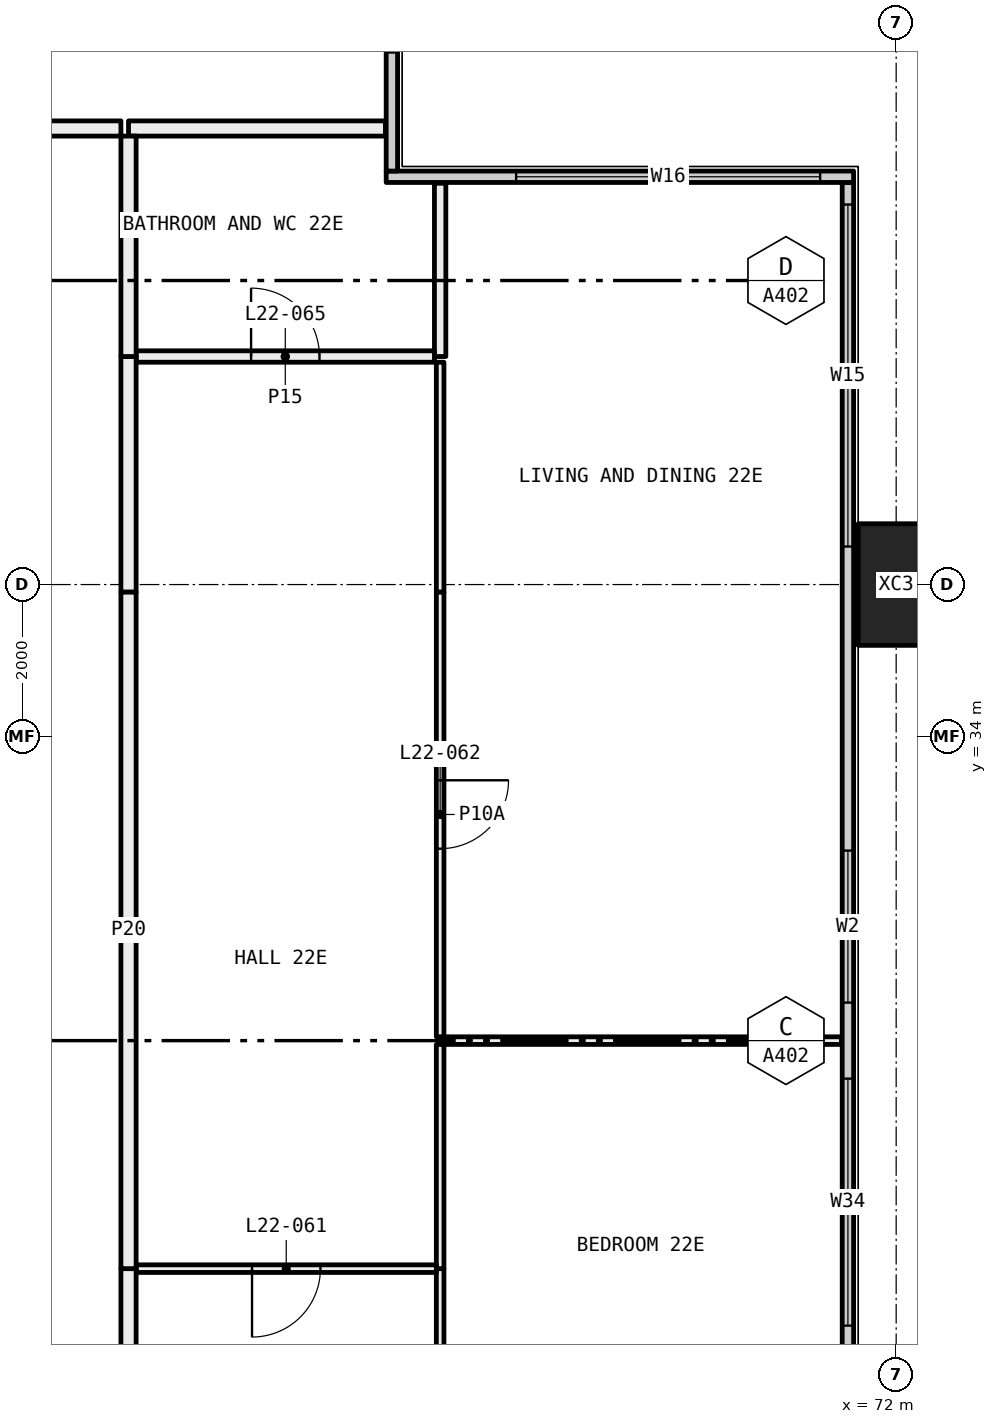
"""IFC4 building model, lengths in metres.
Left out: names, types, materials, properties, quantities, classifications, styles, units other than length and angle.
Written with IfcOpenShell. Run it as: python <this file> out.ifc"""

import sys

from ifc_helpers import new_model, si_unit, direction, frame, frame_2d, origin, origin_2d, place, context, subcontext, project, spatial, rectangle, hollow_rectangle, extrude, element, fill, save


model = new_model("IFC4")
c1 = context("Model", 3, precision=1e-05, world=origin(), true_north=direction((0.0, 1.0)))
c2 = subcontext(c1, "Body", "Model", "MODEL_VIEW")
j1 = project(units=[si_unit("LENGTHUNIT", "METRE"), si_unit("PLANEANGLEUNIT", "RADIAN")], contexts=[c1])
p1 = place(None, origin())
s1 = spatial("IfcSite", under=j1, at=p1, CompositionType="ELEMENT")
p2 = place(p1, origin())
s2 = spatial("IfcBuilding", under=s1, at=p2, CompositionType="ELEMENT")
p3 = place(p2, frame((0.0, 0.0, 88.65)))
s3 = spatial("IfcBuildingStorey", under=s2, at=p3, CompositionType="ELEMENT", Elevation=88.65)
p4 = place(p3, frame((72.0, 36.0, -0.4), z_axis=(0.0, 0.0, 1.0), x_axis=(0.0, 1.0, 0.0)))
e1 = element("IfcColumn", 1, at=p4, inside=s3, PredefinedType="COLUMN", context=c2, shape_type="SweptSolid", body=[
    extrude(hollow_rectangle(XDim=1.6, YDim=1.0, WallThickness=0.065, at=origin_2d()), origin(), (0.0, 0.0, 1.0), 3.45),
])
p5 = place(p3, frame((71.365, 6.71, 0.0), z_axis=(0.0, 0.0, 1.0), x_axis=(0.0, 1.0, 0.0)))
e2 = element("IfcWall", 2, at=p5, inside=s3, PredefinedType="ELEMENTEDWALL", context=c2, shape_type="SweptSolid", body=[
    extrude(rectangle(XDim=34.58, YDim=0.15, at=frame_2d((17.29, 0.0))), origin(), (0.0, 0.0, 1.0), 3.05),
])
p6 = place(p5, frame((0.29, 0.0, 0.45)))
e3 = element("IfcOpeningElement", 3, at=p6, cuts=e2, PredefinedType="OPENING", context=c2, shape_type="SweptSolid", body=[
    extrude(rectangle(XDim=4.5, YDim=2.55, at=frame_2d((2.25, 1.275))), frame((0.0, 0.085, 0.0), z_axis=(0.0, -1.0, 0.0), x_axis=(1.0, 0.0, 0.0)), (0.0, 0.0, 1.0), 0.17),
])
p7 = place(p5, frame((7.54, 0.0, 0.45)))
e4 = element("IfcOpeningElement", 4, at=p7, cuts=e2, PredefinedType="OPENING", context=c2, shape_type="SweptSolid", body=[
    extrude(rectangle(XDim=3.25, YDim=2.55, at=frame_2d((1.625, 1.275))), frame((0.0, 0.085, 0.0), z_axis=(0.0, -1.0, 0.0), x_axis=(1.0, 0.0, 0.0)), (0.0, 0.0, 1.0), 0.17),
])
p8 = place(p5, frame((11.79, 0.0, 0.45)))
e5 = element("IfcOpeningElement", 5, at=p8, cuts=e2, PredefinedType="OPENING", context=c2, shape_type="SweptSolid", body=[
    extrude(rectangle(XDim=3.25, YDim=2.55, at=frame_2d((1.625, 1.275))), frame((0.0, 0.085, 0.0), z_axis=(0.0, -1.0, 0.0), x_axis=(1.0, 0.0, 0.0)), (0.0, 0.0, 1.0), 0.17),
])
p9 = place(p5, frame((19.54, 0.0, 0.45)))
e6 = element("IfcOpeningElement", 6, at=p9, cuts=e2, PredefinedType="OPENING", context=c2, shape_type="SweptSolid", body=[
    extrude(rectangle(XDim=3.25, YDim=2.55, at=frame_2d((1.625, 1.275))), frame((0.0, 0.085, 0.0), z_axis=(0.0, -1.0, 0.0), x_axis=(1.0, 0.0, 0.0)), (0.0, 0.0, 1.0), 0.17),
])
p10 = place(p5, frame((23.79, 0.0, 0.45)))
e7 = element("IfcOpeningElement", 7, at=p10, cuts=e2, PredefinedType="OPENING", context=c2, shape_type="SweptSolid", body=[
    extrude(rectangle(XDim=2.0, YDim=2.55, at=frame_2d((1.0, 1.275))), frame((0.0, 0.085, 0.0), z_axis=(0.0, -1.0, 0.0), x_axis=(1.0, 0.0, 0.0)), (0.0, 0.0, 1.0), 0.17),
])
p11 = place(p5, frame((29.79, 0.0, 0.45)))
e8 = element("IfcOpeningElement", 8, at=p11, cuts=e2, PredefinedType="OPENING", context=c2, shape_type="SweptSolid", body=[
    extrude(rectangle(XDim=4.5, YDim=2.55, at=frame_2d((2.25, 1.275))), frame((0.0, 0.085, 0.0), z_axis=(0.0, -1.0, 0.0), x_axis=(1.0, 0.0, 0.0)), (0.0, 0.0, 1.0), 0.17),
])
p12 = place(p3, frame((65.29, 41.365, 0.0), z_axis=(0.0, 0.0, 1.0), x_axis=(1.0, 0.0, 0.0)))
e9 = element("IfcWall", 9, at=p12, inside=s3, PredefinedType="ELEMENTEDWALL", context=c2, shape_type="SweptSolid", body=[
    extrude(rectangle(XDim=6.15, YDim=0.15, at=frame_2d((3.075, 0.0))), origin(), (0.0, 0.0, 1.0), 3.05),
])
p13 = place(p12, frame((1.71, 0.0, 0.45)))
e10 = element("IfcOpeningElement", 10, at=p13, cuts=e9, PredefinedType="OPENING", context=c2, shape_type="SweptSolid", body=[
    extrude(rectangle(XDim=4.0, YDim=2.55, at=frame_2d((2.0, 1.275))), frame((0.0, 0.085, 0.0), z_axis=(0.0, -1.0, 0.0), x_axis=(1.0, 0.0, 0.0)), (0.0, 0.0, 1.0), 0.17),
])
p14 = place(p3, frame((65.365, 41.44, 0.0), z_axis=(0.0, 0.0, 1.0), x_axis=(0.0, 1.0, 0.0)))
e11 = element("IfcWall", 11, at=p14, inside=s3, PredefinedType="ELEMENTEDWALL", context=c2, shape_type="SweptSolid", body=[
    extrude(rectangle(XDim=5.85, YDim=0.15, at=frame_2d((2.925, 0.0))), origin(), (0.0, 0.0, 1.0), 3.05),
])
p15 = place(p14, frame((1.56, 0.0, 0.45)))
e12 = element("IfcOpeningElement", 12, at=p15, cuts=e11, PredefinedType="OPENING", context=c2, shape_type="SweptSolid", body=[
    extrude(rectangle(XDim=4.0, YDim=2.55, at=frame_2d((2.0, 1.275))), frame((0.0, 0.085, 0.0), z_axis=(0.0, -1.0, 0.0), x_axis=(1.0, 0.0, 0.0)), (0.0, 0.0, 1.0), 0.17),
])
p16 = place(p3, frame((71.28, 30.0, 0.0), z_axis=(0.0, 0.0, 1.0), x_axis=(-1.0, 0.0, 0.0)))
e13 = element("IfcWall", 13, at=p16, inside=s3, PredefinedType="PARTITIONING", context=c2, shape_type="SweptSolid", body=[
    extrude(rectangle(XDim=5.28, YDim=0.1, at=frame_2d((2.64, 0.0))), origin(), (0.0, 0.0, 1.0), 3.05),
])
p17 = place(p3, frame((66.0, 27.0, 0.0), z_axis=(0.0, 0.0, 1.0), x_axis=(0.0, -1.0, 0.0)))
e14 = element("IfcWall", 14, at=p17, inside=s3, PredefinedType="PARTITIONING", context=c2, shape_type="SweptSolid", body=[
    extrude(rectangle(XDim=2.95, YDim=0.1, at=frame_2d((1.475, 0.0))), origin(), (0.0, 0.0, 1.0), 2.45),
])
p18 = place(p3, frame((66.0, 29.95, 0.0), z_axis=(0.0, 0.0, 1.0), x_axis=(0.0, -1.0, 0.0)))
e15 = element("IfcWall", 15, at=p18, inside=s3, PredefinedType="PARTITIONING", context=c2, shape_type="SweptSolid", body=[
    extrude(rectangle(XDim=2.95, YDim=0.1, at=frame_2d((1.475, 0.0))), origin(), (0.0, 0.0, 1.0), 3.05),
])
p19 = place(p3, frame((66.0, 38.925, 0.0), z_axis=(0.0, 0.0, 1.0), x_axis=(0.0, -1.0, 0.0)))
e16 = element("IfcWall", 16, at=p19, inside=s3, PredefinedType="PARTITIONING", context=c2, shape_type="SweptSolid", body=[
    extrude(rectangle(XDim=3.025, YDim=0.1, at=frame_2d((1.513, 0.0))), origin(), (0.0, 0.0, 1.0), 2.45),
])
p20 = place(p3, frame((66.0, 35.9, 0.0), z_axis=(0.0, 0.0, 1.0), x_axis=(0.0, -1.0, 0.0)))
e17 = element("IfcWall", 17, at=p20, inside=s3, PredefinedType="PARTITIONING", context=c2, shape_type="SweptSolid", body=[
    extrude(rectangle(XDim=5.85, YDim=0.1, at=frame_2d((2.925, 0.0))), origin(), (0.0, 0.0, 1.0), 3.05),
])
p21 = place(p20, frame((2.475, 0.0, 0.0)))
e18 = element("IfcOpeningElement", 18, at=p21, cuts=e17, PredefinedType="OPENING", context=c2, shape_type="SweptSolid", body=[
    extrude(rectangle(XDim=0.9, YDim=2.1, at=frame_2d((0.45, 1.05))), frame((0.0, 0.06, 0.0), z_axis=(0.0, -1.0, 0.0), x_axis=(1.0, 0.0, 0.0)), (0.0, 0.0, 1.0), 0.12),
])
p22 = place(p3, frame((66.0, 41.28, 0.0), z_axis=(0.0, 0.0, 1.0), x_axis=(0.0, -1.0, 0.0)))
e19 = element("IfcWall", 19, at=p22, inside=s3, PredefinedType="PARTITIONING", context=c2, shape_type="SweptSolid", body=[
    extrude(rectangle(XDim=2.28, YDim=0.15, at=frame_2d((1.14, 0.0))), origin(), (0.0, 0.0, 1.0), 3.05),
])
p23 = place(p3, frame((65.95, 27.0, 0.0), z_axis=(0.0, 0.0, 1.0), x_axis=(-1.0, 0.0, 0.0)))
e20 = element("IfcWall", 20, at=p23, inside=s3, PredefinedType="PARTITIONING", context=c2, shape_type="SweptSolid", body=[
    extrude(rectangle(XDim=3.95, YDim=0.1, at=frame_2d((1.975, 0.0))), origin(), (0.0, 0.0, 1.0), 3.05),
])
p24 = place(p23, frame((1.525, 0.0, 0.0)))
e21 = element("IfcOpeningElement", 21, at=p24, cuts=e20, PredefinedType="OPENING", context=c2, shape_type="SweptSolid", body=[
    extrude(rectangle(XDim=0.9, YDim=2.1, at=frame_2d((0.45, 1.05))), frame((0.0, 0.06, 0.0), z_axis=(0.0, -1.0, 0.0), x_axis=(1.0, 0.0, 0.0)), (0.0, 0.0, 1.0), 0.12),
])
p25 = place(p3, frame((61.9, 27.0, 0.0), z_axis=(0.0, 0.0, 1.0), x_axis=(0.0, -1.0, 0.0)))
e22 = element("IfcWall", 22, at=p25, inside=s3, PredefinedType="PARTITIONING", context=c2, shape_type="SweptSolid", body=[
    extrude(rectangle(XDim=3.1, YDim=0.2, at=frame_2d((1.55, 0.0))), origin(), (0.0, 0.0, 1.0), 2.45),
])
p26 = place(p25, frame((1.05, 0.0, 0.0)))
e23 = element("IfcOpeningElement", 23, at=p26, cuts=e22, PredefinedType="OPENING", context=c2, shape_type="SweptSolid", body=[
    extrude(rectangle(XDim=1.0, YDim=2.1, at=frame_2d((0.5, 1.05))), frame((0.0, 0.11, 0.0), z_axis=(0.0, -1.0, 0.0), x_axis=(1.0, 0.0, 0.0)), (0.0, 0.0, 1.0), 0.22),
])
p27 = place(p3, frame((65.925, 39.0, 0.0), z_axis=(0.0, 0.0, 1.0), x_axis=(-1.0, 0.0, 0.0)))
e24 = element("IfcWall", 24, at=p27, inside=s3, PredefinedType="PARTITIONING", context=c2, shape_type="SweptSolid", body=[
    extrude(rectangle(XDim=3.925, YDim=0.15, at=frame_2d((1.962, 0.0))), origin(), (0.0, 0.0, 1.0), 3.05),
])
p28 = place(p27, frame((1.512, 0.0, 0.0)))
e25 = element("IfcOpeningElement", 25, at=p28, cuts=e24, PredefinedType="OPENING", context=c2, shape_type="SweptSolid", body=[
    extrude(rectangle(XDim=0.9, YDim=2.1, at=frame_2d((0.45, 1.05))), frame((0.0, 0.085, 0.0), z_axis=(0.0, -1.0, 0.0), x_axis=(1.0, 0.0, 0.0)), (0.0, 0.0, 1.0), 0.17),
])
p29 = place(p3, frame((61.9, 39.0, 0.0), z_axis=(0.0, 0.0, 1.0), x_axis=(0.0, -1.0, 0.0)))
e26 = element("IfcWall", 26, at=p29, inside=s3, PredefinedType="PARTITIONING", context=c2, shape_type="SweptSolid", body=[
    extrude(rectangle(XDim=3.1, YDim=0.2, at=frame_2d((1.55, 0.0))), origin(), (0.0, 0.0, 1.0), 2.45),
])
p30 = place(p3, frame((61.9, 35.9, 0.0), z_axis=(0.0, 0.0, 1.0), x_axis=(0.0, -1.0, 0.0)))
e27 = element("IfcWall", 27, at=p30, inside=s3, PredefinedType="PARTITIONING", context=c2, shape_type="SweptSolid", body=[
    extrude(rectangle(XDim=8.9, YDim=0.2, at=frame_2d((4.45, 0.0))), origin(), (0.0, 0.0, 1.0), 3.05),
])
p31 = place(p3, frame((65.28, 42.0, 0.0), z_axis=(0.0, 0.0, 1.0), x_axis=(-1.0, 0.0, 0.0)))
e28 = element("IfcWall", 28, at=p31, inside=s3, PredefinedType="PARTITIONING", context=c2, shape_type="SweptSolid", body=[
    extrude(rectangle(XDim=3.38, YDim=0.2, at=frame_2d((1.69, 0.0))), origin(), (0.0, 0.0, 1.0), 3.05),
])
p32 = place(p3, frame((61.9, 41.9, 0.0), z_axis=(0.0, 0.0, 1.0), x_axis=(0.0, -1.0, 0.0)))
e29 = element("IfcWall", 29, at=p32, inside=s3, PredefinedType="PARTITIONING", context=c2, shape_type="SweptSolid", body=[
    extrude(rectangle(XDim=2.9, YDim=0.2, at=frame_2d((1.45, 0.0))), origin(), (0.0, 0.0, 1.0), 3.05),
])
p33 = place(p3, frame((60.0, 42.0, 0.0), z_axis=(0.0, 0.0, 1.0), x_axis=(1.0, 0.0, 0.0)))
e30 = element("IfcWall", 30, at=p33, inside=s3, PredefinedType="PARTITIONING", context=c2, shape_type="SweptSolid", body=[
    extrude(rectangle(XDim=1.8, YDim=0.2, at=frame_2d((0.9, 0.0))), origin(), (0.0, 0.0, 1.0), 3.05),
])
p34 = place(p9, origin())
e31 = element("IfcWindow", 31, at=p34, inside=s3, PartitioningType="SINGLE_PANEL", PredefinedType="WINDOW", context=c2, shape_type="SweptSolid", body=[
    extrude(rectangle(XDim=3.25, YDim=2.55, at=frame_2d((1.625, 1.275))), frame((0.0, 0.03, 0.0), z_axis=(0.0, -1.0, 0.0), x_axis=(1.0, 0.0, 0.0)), (0.0, 0.0, 1.0), 0.06),
])
fill(e6, e31)
p35 = place(p10, origin())
e32 = element("IfcWindow", 32, at=p35, inside=s3, PartitioningType="SINGLE_PANEL", PredefinedType="WINDOW", context=c2, shape_type="SweptSolid", body=[
    extrude(rectangle(XDim=2.0, YDim=2.55, at=frame_2d((1.0, 1.275))), frame((0.0, 0.03, 0.0), z_axis=(0.0, -1.0, 0.0), x_axis=(1.0, 0.0, 0.0)), (0.0, 0.0, 1.0), 0.06),
])
fill(e7, e32)
p36 = place(p11, origin())
e33 = element("IfcWindow", 33, at=p36, inside=s3, PartitioningType="SINGLE_PANEL", PredefinedType="WINDOW", context=c2, shape_type="SweptSolid", body=[
    extrude(rectangle(XDim=4.5, YDim=2.55, at=frame_2d((2.25, 1.275))), frame((0.0, 0.03, 0.0), z_axis=(0.0, -1.0, 0.0), x_axis=(1.0, 0.0, 0.0)), (0.0, 0.0, 1.0), 0.06),
])
fill(e8, e33)
p37 = place(p13, origin())
e34 = element("IfcWindow", 34, at=p37, inside=s3, PartitioningType="SINGLE_PANEL", PredefinedType="WINDOW", context=c2, shape_type="SweptSolid", body=[
    extrude(rectangle(XDim=4.0, YDim=2.55, at=frame_2d((2.0, 1.275))), frame((0.0, 0.03, 0.0), z_axis=(0.0, -1.0, 0.0), x_axis=(1.0, 0.0, 0.0)), (0.0, 0.0, 1.0), 0.06),
])
fill(e10, e34)
p38 = place(p24, origin())
e35 = element("IfcDoor", 35, at=p38, inside=s3, OperationType="SINGLE_SWING_LEFT", PredefinedType="DOOR", context=c2, shape_type="SweptSolid", body=[
    extrude(rectangle(XDim=0.9, YDim=2.1, at=frame_2d((0.45, 1.05))), frame((0.0, 0.025, 0.0), z_axis=(0.0, -1.0, 0.0), x_axis=(1.0, 0.0, 0.0)), (0.0, 0.0, 1.0), 0.05),
])
fill(e21, e35)
p39 = place(p21, origin())
e36 = element("IfcDoor", 36, at=p39, inside=s3, OperationType="SINGLE_SWING_RIGHT", PredefinedType="DOOR", context=c2, shape_type="SweptSolid", body=[
    extrude(rectangle(XDim=0.9, YDim=2.1, at=frame_2d((0.45, 1.05))), frame((0.0, 0.025, 0.0), z_axis=(0.0, -1.0, 0.0), x_axis=(1.0, 0.0, 0.0)), (0.0, 0.0, 1.0), 0.05),
])
fill(e18, e36)
p40 = place(p28, frame((0.9, 0.0, 0.0), x_axis=(-1.0, 0.0, 0.0)))
e37 = element("IfcDoor", 37, at=p40, inside=s3, OperationType="SINGLE_SWING_RIGHT", PredefinedType="DOOR", context=c2, shape_type="SweptSolid", body=[
    extrude(rectangle(XDim=0.9, YDim=2.1, at=frame_2d((0.45, 1.05))), frame((0.0, 0.025, 0.0), z_axis=(0.0, -1.0, 0.0), x_axis=(1.0, 0.0, 0.0)), (0.0, 0.0, 1.0), 0.05),
])
fill(e25, e37)
save(model, sys.argv[1])
